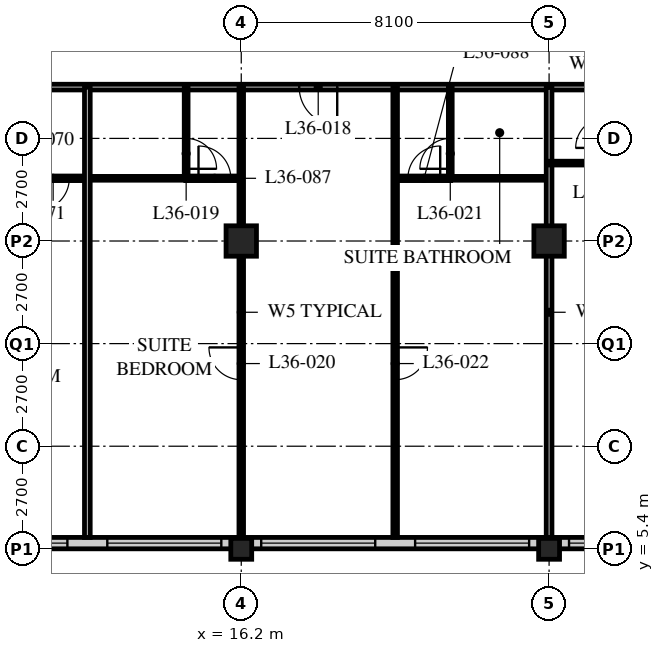
"""IFC4 building model, lengths in metres.
Left out: names, types, materials, properties, quantities, classifications, styles, units other than length and angle.
Written with IfcOpenShell. Run it as: python <this file> out.ifc"""

import sys

from ifc_helpers import new_model, si_unit, direction, frame, frame_2d, origin, origin_2d, place, context, subcontext, project, spatial, rectangle, hollow_rectangle, extrude, element, fill, save


model = new_model("IFC4")
c1 = context("Model", 3, precision=1e-05, world=origin(), true_north=direction((0.0, 1.0)))
c2 = subcontext(c1, "Body", "Model", "MODEL_VIEW")
j1 = project(units=[si_unit("LENGTHUNIT", "METRE"), si_unit("PLANEANGLEUNIT", "RADIAN")], contexts=[c1])
p1 = place(None, origin())
s1 = spatial("IfcSite", under=j1, at=p1, CompositionType="ELEMENT")
p2 = place(p1, origin())
s2 = spatial("IfcBuilding", under=s1, at=p2, CompositionType="ELEMENT")
p3 = place(p2, frame((0.0, 0.0, 140.8)))
s3 = spatial("IfcBuildingStorey", under=s2, at=p3, CompositionType="ELEMENT", Elevation=140.8)
p4 = place(p3, frame((16.2, 5.4, 0.0), z_axis=(0.0, 0.0, 1.0), x_axis=(1.0, 0.0, 0.0)))
e1 = element("IfcColumn", 1, at=p4, inside=s3, PredefinedType="COLUMN", context=c2, shape_type="SweptSolid", body=[
    extrude(hollow_rectangle(XDim=0.55, YDim=0.55, WallThickness=0.04, at=origin_2d()), origin(), (0.0, 0.0, 1.0), 3.4),
])
p5 = place(p3, frame((16.2, 13.5, 0.0), z_axis=(0.0, 0.0, 1.0), x_axis=(1.0, 0.0, 0.0)))
e2 = element("IfcColumn", 2, at=p5, inside=s3, PredefinedType="COLUMN", context=c2, shape_type="SweptSolid", body=[
    extrude(hollow_rectangle(XDim=0.8, YDim=0.8, WallThickness=0.08, at=origin_2d()), origin(), (0.0, 0.0, 1.0), 3.4),
])
p6 = place(p3, frame((24.3, 5.4, 0.0), z_axis=(0.0, 0.0, 1.0), x_axis=(1.0, 0.0, 0.0)))
e3 = element("IfcColumn", 3, at=p6, inside=s3, PredefinedType="COLUMN", context=c2, shape_type="SweptSolid", body=[
    extrude(hollow_rectangle(XDim=0.55, YDim=0.55, WallThickness=0.04, at=origin_2d()), origin(), (0.0, 0.0, 1.0), 3.4),
])
p7 = place(p3, frame((24.3, 13.5, 0.0), z_axis=(0.0, 0.0, 1.0), x_axis=(1.0, 0.0, 0.0)))
e4 = element("IfcColumn", 4, at=p7, inside=s3, PredefinedType="COLUMN", context=c2, shape_type="SweptSolid", body=[
    extrude(hollow_rectangle(XDim=0.8, YDim=0.8, WallThickness=0.08, at=origin_2d()), origin(), (0.0, 0.0, 1.0), 3.4),
])
p8 = place(p3, frame((8.4, 5.55, 0.0), z_axis=(0.0, 0.0, 1.0), x_axis=(1.0, 0.0, 0.0)))
e5 = element("IfcWall", 5, at=p8, inside=s3, PredefinedType="SOLIDWALL", context=c2, shape_type="SweptSolid", body=[
    extrude(rectangle(XDim=40.2, YDim=0.3, at=frame_2d((20.1, 0.0))), origin(), (0.0, 0.0, 1.0), 3.19),
])
p9 = place(p8, frame((0.225, 0.0, 0.9)))
e6 = element("IfcOpeningElement", 6, at=p9, cuts=e5, PredefinedType="OPENING", context=c2, shape_type="SweptSolid", body=[
    extrude(rectangle(XDim=3.0, YDim=2.0, at=frame_2d((1.5, 1.0))), frame((0.0, 0.16, 0.0), z_axis=(0.0, -1.0, 0.0), x_axis=(1.0, 0.0, 0.0)), (0.0, 0.0, 1.0), 0.32),
])
p10 = place(p8, frame((4.275, 0.0, 0.9)))
e7 = element("IfcOpeningElement", 7, at=p10, cuts=e5, PredefinedType="OPENING", context=c2, shape_type="SweptSolid", body=[
    extrude(rectangle(XDim=3.0, YDim=2.0, at=frame_2d((1.5, 1.0))), frame((0.0, 0.16, 0.0), z_axis=(0.0, -1.0, 0.0), x_axis=(1.0, 0.0, 0.0)), (0.0, 0.0, 1.0), 0.32),
])
p11 = place(p8, frame((8.325, 0.0, 0.9)))
e8 = element("IfcOpeningElement", 8, at=p11, cuts=e5, PredefinedType="OPENING", context=c2, shape_type="SweptSolid", body=[
    extrude(rectangle(XDim=3.0, YDim=2.0, at=frame_2d((1.5, 1.0))), frame((0.0, 0.16, 0.0), z_axis=(0.0, -1.0, 0.0), x_axis=(1.0, 0.0, 0.0)), (0.0, 0.0, 1.0), 0.32),
])
p12 = place(p8, frame((12.375, 0.0, 0.9)))
e9 = element("IfcOpeningElement", 9, at=p12, cuts=e5, PredefinedType="OPENING", context=c2, shape_type="SweptSolid", body=[
    extrude(rectangle(XDim=3.0, YDim=2.0, at=frame_2d((1.5, 1.0))), frame((0.0, 0.16, 0.0), z_axis=(0.0, -1.0, 0.0), x_axis=(1.0, 0.0, 0.0)), (0.0, 0.0, 1.0), 0.32),
])
p13 = place(p8, frame((16.425, 0.0, 0.9)))
e10 = element("IfcOpeningElement", 10, at=p13, cuts=e5, PredefinedType="OPENING", context=c2, shape_type="SweptSolid", body=[
    extrude(rectangle(XDim=3.0, YDim=2.0, at=frame_2d((1.5, 1.0))), frame((0.0, 0.16, 0.0), z_axis=(0.0, -1.0, 0.0), x_axis=(1.0, 0.0, 0.0)), (0.0, 0.0, 1.0), 0.32),
])
p14 = place(p8, frame((20.475, 0.0, 0.9)))
e11 = element("IfcOpeningElement", 11, at=p14, cuts=e5, PredefinedType="OPENING", context=c2, shape_type="SweptSolid", body=[
    extrude(rectangle(XDim=3.0, YDim=2.0, at=frame_2d((1.5, 1.0))), frame((0.0, 0.16, 0.0), z_axis=(0.0, -1.0, 0.0), x_axis=(1.0, 0.0, 0.0)), (0.0, 0.0, 1.0), 0.32),
])
p15 = place(p8, frame((24.525, 0.0, 0.9)))
e12 = element("IfcOpeningElement", 12, at=p15, cuts=e5, PredefinedType="OPENING", context=c2, shape_type="SweptSolid", body=[
    extrude(rectangle(XDim=3.0, YDim=2.0, at=frame_2d((1.5, 1.0))), frame((0.0, 0.16, 0.0), z_axis=(0.0, -1.0, 0.0), x_axis=(1.0, 0.0, 0.0)), (0.0, 0.0, 1.0), 0.32),
])
p16 = place(p8, frame((28.575, 0.0, 0.9)))
e13 = element("IfcOpeningElement", 13, at=p16, cuts=e5, PredefinedType="OPENING", context=c2, shape_type="SweptSolid", body=[
    extrude(rectangle(XDim=3.0, YDim=2.0, at=frame_2d((1.5, 1.0))), frame((0.0, 0.16, 0.0), z_axis=(0.0, -1.0, 0.0), x_axis=(1.0, 0.0, 0.0)), (0.0, 0.0, 1.0), 0.32),
])
p17 = place(p8, frame((32.625, 0.0, 0.9)))
e14 = element("IfcOpeningElement", 14, at=p17, cuts=e5, PredefinedType="OPENING", context=c2, shape_type="SweptSolid", body=[
    extrude(rectangle(XDim=3.0, YDim=2.0, at=frame_2d((1.5, 1.0))), frame((0.0, 0.16, 0.0), z_axis=(0.0, -1.0, 0.0), x_axis=(1.0, 0.0, 0.0)), (0.0, 0.0, 1.0), 0.32),
])
p18 = place(p8, frame((36.675, 0.0, 0.9)))
e15 = element("IfcOpeningElement", 15, at=p18, cuts=e5, PredefinedType="OPENING", context=c2, shape_type="SweptSolid", body=[
    extrude(rectangle(XDim=3.0, YDim=2.0, at=frame_2d((1.5, 1.0))), frame((0.0, 0.16, 0.0), z_axis=(0.0, -1.0, 0.0), x_axis=(1.0, 0.0, 0.0)), (0.0, 0.0, 1.0), 0.32),
])
p19 = place(p3, frame((8.1, 17.55, 0.0), z_axis=(0.0, 0.0, 1.0), x_axis=(1.0, 0.0, 0.0)))
e16 = element("IfcWall", 16, at=p19, inside=s3, PredefinedType="PARTITIONING", context=c2, shape_type="SweptSolid", body=[
    extrude(rectangle(XDim=36.45, YDim=0.15, at=frame_2d((18.225, 0.0))), origin(), (0.0, 0.0, 1.0), 3.19),
])
p20 = place(p19, frame((9.625, 0.0, 0.0)))
e17 = element("IfcOpeningElement", 17, at=p20, cuts=e16, PredefinedType="OPENING", context=c2, shape_type="SweptSolid", body=[
    extrude(rectangle(XDim=1.0, YDim=2.1, at=frame_2d((0.5, 1.05))), frame((0.0, 0.085, 0.0), z_axis=(0.0, -1.0, 0.0), x_axis=(1.0, 0.0, 0.0)), (0.0, 0.0, 1.0), 0.17),
])
p21 = place(p19, frame((18.1, 0.0, 0.0)))
e18 = element("IfcOpeningElement", 18, at=p21, cuts=e16, PredefinedType="OPENING", context=c2, shape_type="SweptSolid", body=[
    extrude(rectangle(XDim=1.0, YDim=2.1, at=frame_2d((0.5, 1.05))), frame((0.0, 0.085, 0.0), z_axis=(0.0, -1.0, 0.0), x_axis=(1.0, 0.0, 0.0)), (0.0, 0.0, 1.0), 0.17),
])
p22 = place(p19, frame((26.75, 0.0, 0.0)))
e19 = element("IfcOpeningElement", 19, at=p22, cuts=e16, PredefinedType="OPENING", context=c2, shape_type="SweptSolid", body=[
    extrude(rectangle(XDim=1.0, YDim=2.1, at=frame_2d((0.5, 1.05))), frame((0.0, 0.085, 0.0), z_axis=(0.0, -1.0, 0.0), x_axis=(1.0, 0.0, 0.0)), (0.0, 0.0, 1.0), 0.17),
])
p23 = place(p19, frame((30.8, 0.0, 0.0)))
e20 = element("IfcOpeningElement", 20, at=p23, cuts=e16, PredefinedType="OPENING", context=c2, shape_type="SweptSolid", body=[
    extrude(rectangle(XDim=1.0, YDim=2.1, at=frame_2d((0.5, 1.05))), frame((0.0, 0.085, 0.0), z_axis=(0.0, -1.0, 0.0), x_axis=(1.0, 0.0, 0.0)), (0.0, 0.0, 1.0), 0.17),
])
p24 = place(p19, frame((1.525, 0.0, 0.0)))
e21 = element("IfcOpeningElement", 21, at=p24, cuts=e16, PredefinedType="OPENING", context=c2, shape_type="SweptSolid", body=[
    extrude(rectangle(XDim=1.0, YDim=2.1, at=frame_2d((0.5, 1.05))), frame((0.0, 0.085, 0.0), z_axis=(0.0, -1.0, 0.0), x_axis=(1.0, 0.0, 0.0)), (0.0, 0.0, 1.0), 0.17),
])
p25 = place(p19, frame((33.925, 0.0, 0.0)))
e22 = element("IfcOpeningElement", 22, at=p25, cuts=e16, PredefinedType="OPENING", context=c2, shape_type="SweptSolid", body=[
    extrude(rectangle(XDim=1.0, YDim=2.1, at=frame_2d((0.5, 1.05))), frame((0.0, 0.085, 0.0), z_axis=(0.0, -1.0, 0.0), x_axis=(1.0, 0.0, 0.0)), (0.0, 0.0, 1.0), 0.17),
])
p26 = place(p3, frame((12.15, 15.15, 0.0), z_axis=(0.0, 0.0, 1.0), x_axis=(1.0, 0.0, 0.0)))
e23 = element("IfcWall", 23, at=p26, inside=s3, PredefinedType="PARTITIONING", context=c2, shape_type="SweptSolid", body=[
    extrude(rectangle(XDim=2.6, YDim=0.1, at=frame_2d((1.3, 0.0))), origin(), (0.0, 0.0, 1.0), 3.19),
])
p27 = place(p3, frame((14.75, 17.55, 0.0), z_axis=(0.0, 0.0, 1.0), x_axis=(0.0, -1.0, 0.0)))
e24 = element("IfcWall", 24, at=p27, inside=s3, PredefinedType="PARTITIONING", context=c2, shape_type="SweptSolid", body=[
    extrude(rectangle(XDim=2.4, YDim=0.1, at=frame_2d((1.2, 0.0))), origin(), (0.0, 0.0, 1.0), 3.19),
])
p28 = place(p27, frame((1.35, 0.0, 0.0)))
e25 = element("IfcOpeningElement", 25, at=p28, cuts=e24, PredefinedType="OPENING", context=c2, shape_type="SweptSolid", body=[
    extrude(rectangle(XDim=0.8, YDim=2.1, at=frame_2d((0.4, 1.05))), frame((0.0, 0.06, 0.0), z_axis=(0.0, -1.0, 0.0), x_axis=(1.0, 0.0, 0.0)), (0.0, 0.0, 1.0), 0.12),
])
p29 = place(p3, frame((16.2, 17.55, 0.0), z_axis=(0.0, 0.0, 1.0), x_axis=(0.0, -1.0, 0.0)))
e26 = element("IfcWall", 26, at=p29, inside=s3, PredefinedType="PARTITIONING", context=c2, shape_type="SweptSolid", body=[
    extrude(rectangle(XDim=11.85, YDim=0.12, at=frame_2d((5.925, 0.0))), origin(), (0.0, 0.0, 1.0), 2.578),
])
p30 = place(p29, frame((6.85, 0.0, 0.0)))
e27 = element("IfcOpeningElement", 27, at=p30, cuts=e26, PredefinedType="OPENING", context=c2, shape_type="SweptSolid", body=[
    extrude(rectangle(XDim=0.85, YDim=2.1, at=frame_2d((0.425, 1.05))), frame((0.0, 0.07, 0.0), z_axis=(0.0, -1.0, 0.0), x_axis=(1.0, 0.0, 0.0)), (0.0, 0.0, 1.0), 0.14),
])
p31 = place(p3, frame((21.7, 15.15, 0.0), z_axis=(0.0, 0.0, 1.0), x_axis=(1.0, 0.0, 0.0)))
e28 = element("IfcWall", 28, at=p31, inside=s3, PredefinedType="PARTITIONING", context=c2, shape_type="SweptSolid", body=[
    extrude(rectangle(XDim=2.6, YDim=0.1, at=frame_2d((1.3, 0.0))), origin(), (0.0, 0.0, 1.0), 3.19),
])
p32 = place(p3, frame((21.7, 17.55, 0.0), z_axis=(0.0, 0.0, 1.0), x_axis=(0.0, -1.0, 0.0)))
e29 = element("IfcWall", 29, at=p32, inside=s3, PredefinedType="PARTITIONING", context=c2, shape_type="SweptSolid", body=[
    extrude(rectangle(XDim=2.4, YDim=0.1, at=frame_2d((1.2, 0.0))), origin(), (0.0, 0.0, 1.0), 3.19),
])
p33 = place(p32, frame((1.35, 0.0, 0.0)))
e30 = element("IfcOpeningElement", 30, at=p33, cuts=e29, PredefinedType="OPENING", context=c2, shape_type="SweptSolid", body=[
    extrude(rectangle(XDim=0.8, YDim=2.1, at=frame_2d((0.4, 1.05))), frame((0.0, 0.06, 0.0), z_axis=(0.0, -1.0, 0.0), x_axis=(1.0, 0.0, 0.0)), (0.0, 0.0, 1.0), 0.12),
])
p34 = place(p3, frame((20.25, 17.55, 0.0), z_axis=(0.0, 0.0, 1.0), x_axis=(0.0, -1.0, 0.0)))
e31 = element("IfcWall", 31, at=p34, inside=s3, PredefinedType="PARTITIONING", context=c2, shape_type="SweptSolid", body=[
    extrude(rectangle(XDim=11.85, YDim=0.12, at=frame_2d((5.925, 0.0))), origin(), (0.0, 0.0, 1.0), 3.19),
])
p35 = place(p34, frame((6.85, 0.0, 0.0)))
e32 = element("IfcOpeningElement", 32, at=p35, cuts=e31, PredefinedType="OPENING", context=c2, shape_type="SweptSolid", body=[
    extrude(rectangle(XDim=0.85, YDim=2.1, at=frame_2d((0.425, 1.05))), frame((0.0, 0.07, 0.0), z_axis=(0.0, -1.0, 0.0), x_axis=(1.0, 0.0, 0.0)), (0.0, 0.0, 1.0), 0.14),
])
p36 = place(p3, frame((24.3, 17.55, 0.0), z_axis=(0.0, 0.0, 1.0), x_axis=(0.0, -1.0, 0.0)))
e33 = element("IfcWall", 33, at=p36, inside=s3, PredefinedType="PARTITIONING", context=c2, shape_type="SweptSolid", body=[
    extrude(rectangle(XDim=11.85, YDim=0.15, at=frame_2d((5.925, 0.0))), origin(), (0.0, 0.0, 1.0), 2.578),
])
p37 = place(p3, frame((24.3, 15.55, 0.0), z_axis=(0.0, 0.0, 1.0), x_axis=(1.0, 0.0, 0.0)))
e34 = element("IfcWall", 34, at=p37, inside=s3, PredefinedType="PARTITIONING", context=c2, shape_type="SweptSolid", body=[
    extrude(rectangle(XDim=1.5, YDim=0.1, at=frame_2d((0.75, 0.0))), origin(), (0.0, 0.0, 1.0), 3.19),
])
p38 = place(p3, frame((4.1, 15.15, 0.0), z_axis=(0.0, 0.0, 1.0), x_axis=(1.0, 0.0, 0.0)))
e35 = element("IfcWall", 35, at=p38, inside=s3, PredefinedType="PARTITIONING", context=c2, shape_type="SweptSolid", body=[
    extrude(rectangle(XDim=8.05, YDim=0.12, at=frame_2d((4.025, 0.0))), origin(), (0.0, 0.0, 1.0), 3.19),
])
p39 = place(p38, frame((6.725, 0.0, 0.0)))
e36 = element("IfcOpeningElement", 36, at=p39, cuts=e35, PredefinedType="OPENING", context=c2, shape_type="SweptSolid", body=[
    extrude(rectangle(XDim=0.85, YDim=2.1, at=frame_2d((0.425, 1.05))), frame((0.0, 0.07, 0.0), z_axis=(0.0, -1.0, 0.0), x_axis=(1.0, 0.0, 0.0)), (0.0, 0.0, 1.0), 0.14),
])
p40 = place(p38, frame((2.875, 0.0, 0.0)))
e37 = element("IfcOpeningElement", 37, at=p40, cuts=e35, PredefinedType="OPENING", context=c2, shape_type="SweptSolid", body=[
    extrude(rectangle(XDim=0.85, YDim=2.1, at=frame_2d((0.425, 1.05))), frame((0.0, 0.07, 0.0), z_axis=(0.0, -1.0, 0.0), x_axis=(1.0, 0.0, 0.0)), (0.0, 0.0, 1.0), 0.14),
])
p41 = place(p3, frame((12.15, 17.55, 0.0), z_axis=(0.0, 0.0, 1.0), x_axis=(0.0, -1.0, 0.0)))
e38 = element("IfcWall", 38, at=p41, inside=s3, PredefinedType="PARTITIONING", context=c2, shape_type="SweptSolid", body=[
    extrude(rectangle(XDim=11.85, YDim=0.15, at=frame_2d((5.925, 0.0))), origin(), (0.0, 0.0, 1.0), 3.19),
])
p42 = place(p3, frame((16.2, 15.15, 0.0), z_axis=(0.0, 0.0, 1.0), x_axis=(-1.0, 0.0, 0.0)))
e39 = element("IfcWall", 39, at=p42, inside=s3, PredefinedType="PARTITIONING", context=c2, shape_type="SweptSolid", body=[
    extrude(rectangle(XDim=1.46, YDim=0.12, at=frame_2d((0.73, 0.0))), origin(), (0.0, 0.0, 1.0), 3.19),
])
p43 = place(p42, frame((0.275, 0.0, 0.0)))
e40 = element("IfcOpeningElement", 40, at=p43, cuts=e39, PredefinedType="OPENING", context=c2, shape_type="SweptSolid", body=[
    extrude(rectangle(XDim=0.85, YDim=2.1, at=frame_2d((0.425, 1.05))), frame((0.0, 0.07, 0.0), z_axis=(0.0, -1.0, 0.0), x_axis=(1.0, 0.0, 0.0)), (0.0, 0.0, 1.0), 0.14),
])
p44 = place(p3, frame((21.71, 15.15, 0.0), z_axis=(0.0, 0.0, 1.0), x_axis=(-1.0, 0.0, 0.0)))
e41 = element("IfcWall", 41, at=p44, inside=s3, PredefinedType="PARTITIONING", context=c2, shape_type="SweptSolid", body=[
    extrude(rectangle(XDim=1.46, YDim=0.12, at=frame_2d((0.73, 0.0))), origin(), (0.0, 0.0, 1.0), 3.19),
])
p45 = place(p44, frame((0.275, 0.0, 0.0)))
e42 = element("IfcOpeningElement", 42, at=p45, cuts=e41, PredefinedType="OPENING", context=c2, shape_type="SweptSolid", body=[
    extrude(rectangle(XDim=0.85, YDim=2.1, at=frame_2d((0.425, 1.05))), frame((0.0, 0.07, 0.0), z_axis=(0.0, -1.0, 0.0), x_axis=(1.0, 0.0, 0.0)), (0.0, 0.0, 1.0), 0.14),
])
p46 = place(p9, origin())
e43 = element("IfcWindow", 43, at=p46, inside=s3, PartitioningType="SINGLE_PANEL", PredefinedType="WINDOW", context=c2, shape_type="SweptSolid", body=[
    extrude(rectangle(XDim=3.0, YDim=2.0, at=frame_2d((1.5, 1.0))), frame((0.0, 0.03, 0.0), z_axis=(0.0, -1.0, 0.0), x_axis=(1.0, 0.0, 0.0)), (0.0, 0.0, 1.0), 0.06),
])
fill(e6, e43)
p47 = place(p10, origin())
e44 = element("IfcWindow", 44, at=p47, inside=s3, PartitioningType="SINGLE_PANEL", PredefinedType="WINDOW", context=c2, shape_type="SweptSolid", body=[
    extrude(rectangle(XDim=3.0, YDim=2.0, at=frame_2d((1.5, 1.0))), frame((0.0, 0.03, 0.0), z_axis=(0.0, -1.0, 0.0), x_axis=(1.0, 0.0, 0.0)), (0.0, 0.0, 1.0), 0.06),
])
fill(e7, e44)
p48 = place(p11, origin())
e45 = element("IfcWindow", 45, at=p48, inside=s3, PartitioningType="SINGLE_PANEL", PredefinedType="WINDOW", context=c2, shape_type="SweptSolid", body=[
    extrude(rectangle(XDim=3.0, YDim=2.0, at=frame_2d((1.5, 1.0))), frame((0.0, 0.03, 0.0), z_axis=(0.0, -1.0, 0.0), x_axis=(1.0, 0.0, 0.0)), (0.0, 0.0, 1.0), 0.06),
])
fill(e8, e45)
p49 = place(p12, origin())
e46 = element("IfcWindow", 46, at=p49, inside=s3, PartitioningType="SINGLE_PANEL", PredefinedType="WINDOW", context=c2, shape_type="SweptSolid", body=[
    extrude(rectangle(XDim=3.0, YDim=2.0, at=frame_2d((1.5, 1.0))), frame((0.0, 0.03, 0.0), z_axis=(0.0, -1.0, 0.0), x_axis=(1.0, 0.0, 0.0)), (0.0, 0.0, 1.0), 0.06),
])
fill(e9, e46)
p50 = place(p13, origin())
e47 = element("IfcWindow", 47, at=p50, inside=s3, PartitioningType="SINGLE_PANEL", PredefinedType="WINDOW", context=c2, shape_type="SweptSolid", body=[
    extrude(rectangle(XDim=3.0, YDim=2.0, at=frame_2d((1.5, 1.0))), frame((0.0, 0.03, 0.0), z_axis=(0.0, -1.0, 0.0), x_axis=(1.0, 0.0, 0.0)), (0.0, 0.0, 1.0), 0.06),
])
fill(e10, e47)
p51 = place(p20, origin())
e48 = element("IfcDoor", 48, at=p51, inside=s3, OperationType="SINGLE_SWING_LEFT", PredefinedType="DOOR", context=c2, shape_type="SweptSolid", body=[
    extrude(rectangle(XDim=1.0, YDim=2.1, at=frame_2d((0.5, 1.05))), frame((0.0, 0.025, 0.0), z_axis=(0.0, -1.0, 0.0), x_axis=(1.0, 0.0, 0.0)), (0.0, 0.0, 1.0), 0.05),
])
fill(e17, e48)
p52 = place(p28, origin())
e49 = element("IfcDoor", 49, at=p52, inside=s3, OperationType="SINGLE_SWING_RIGHT", PredefinedType="DOOR", context=c2, shape_type="SweptSolid", body=[
    extrude(rectangle(XDim=0.8, YDim=2.1, at=frame_2d((0.4, 1.05))), frame((0.0, 0.025, 0.0), z_axis=(0.0, -1.0, 0.0), x_axis=(1.0, 0.0, 0.0)), (0.0, 0.0, 1.0), 0.05),
])
fill(e25, e49)
p53 = place(p30, origin())
e50 = element("IfcDoor", 50, at=p53, inside=s3, OperationType="SINGLE_SWING_RIGHT", PredefinedType="DOOR", context=c2, shape_type="SweptSolid", body=[
    extrude(rectangle(XDim=0.85, YDim=2.1, at=frame_2d((0.425, 1.05))), frame((0.0, 0.025, 0.0), z_axis=(0.0, -1.0, 0.0), x_axis=(1.0, 0.0, 0.0)), (0.0, 0.0, 1.0), 0.05),
])
fill(e27, e50)
p54 = place(p33, origin())
e51 = element("IfcDoor", 51, at=p54, inside=s3, OperationType="SINGLE_SWING_LEFT", PredefinedType="DOOR", context=c2, shape_type="SweptSolid", body=[
    extrude(rectangle(XDim=0.8, YDim=2.1, at=frame_2d((0.4, 1.05))), frame((0.0, 0.025, 0.0), z_axis=(0.0, -1.0, 0.0), x_axis=(1.0, 0.0, 0.0)), (0.0, 0.0, 1.0), 0.05),
])
fill(e30, e51)
p55 = place(p35, origin())
e52 = element("IfcDoor", 52, at=p55, inside=s3, OperationType="SINGLE_SWING_LEFT", PredefinedType="DOOR", context=c2, shape_type="SweptSolid", body=[
    extrude(rectangle(XDim=0.85, YDim=2.1, at=frame_2d((0.425, 1.05))), frame((0.0, 0.025, 0.0), z_axis=(0.0, -1.0, 0.0), x_axis=(1.0, 0.0, 0.0)), (0.0, 0.0, 1.0), 0.05),
])
fill(e32, e52)
p56 = place(p39, origin())
e53 = element("IfcDoor", 53, at=p56, inside=s3, OperationType="SINGLE_SWING_RIGHT", PredefinedType="DOOR", context=c2, shape_type="SweptSolid", body=[
    extrude(rectangle(XDim=0.85, YDim=2.1, at=frame_2d((0.425, 1.05))), frame((0.0, 0.025, 0.0), z_axis=(0.0, -1.0, 0.0), x_axis=(1.0, 0.0, 0.0)), (0.0, 0.0, 1.0), 0.05),
])
fill(e36, e53)
p57 = place(p43, origin())
e54 = element("IfcDoor", 54, at=p57, inside=s3, OperationType="SINGLE_SWING_LEFT", PredefinedType="DOOR", context=c2, shape_type="SweptSolid", body=[
    extrude(rectangle(XDim=0.85, YDim=2.1, at=frame_2d((0.425, 1.05))), frame((0.0, 0.025, 0.0), z_axis=(0.0, -1.0, 0.0), x_axis=(1.0, 0.0, 0.0)), (0.0, 0.0, 1.0), 0.05),
])
fill(e40, e54)
p58 = place(p45, origin())
e55 = element("IfcDoor", 55, at=p58, inside=s3, OperationType="SINGLE_SWING_RIGHT", PredefinedType="DOOR", context=c2, shape_type="SweptSolid", body=[
    extrude(rectangle(XDim=0.85, YDim=2.1, at=frame_2d((0.425, 1.05))), frame((0.0, 0.025, 0.0), z_axis=(0.0, -1.0, 0.0), x_axis=(1.0, 0.0, 0.0)), (0.0, 0.0, 1.0), 0.05),
])
fill(e42, e55)
save(model, sys.argv[1])
